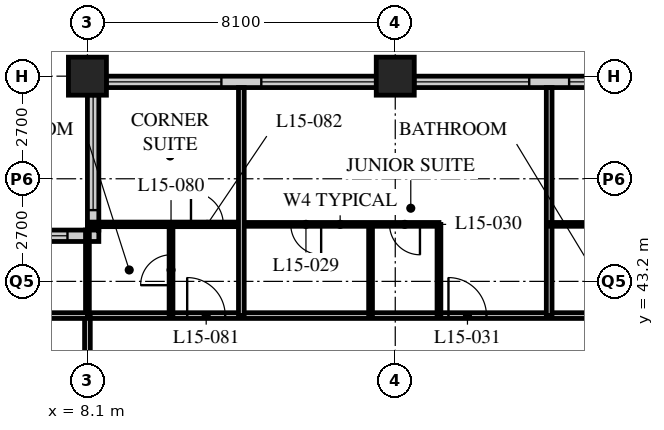
"""IFC4 building model, lengths in metres.
Left out: names, types, materials, properties, quantities, classifications, styles, units other than length and angle.
Written with IfcOpenShell. Run it as: python <this file> out.ifc"""

import sys

from ifc_helpers import new_model, si_unit, direction, frame, frame_2d, origin, origin_2d, place, context, subcontext, project, spatial, rectangle, hollow_rectangle, extrude, element, fill, save


model = new_model("IFC4")
c1 = context("Model", 3, precision=1e-05, world=origin(), true_north=direction((0.0, 1.0)))
c2 = subcontext(c1, "Body", "Model", "MODEL_VIEW")
j1 = project(units=[si_unit("LENGTHUNIT", "METRE"), si_unit("PLANEANGLEUNIT", "RADIAN")], contexts=[c1])
p1 = place(None, origin())
s1 = spatial("IfcSite", under=j1, at=p1, CompositionType="ELEMENT")
p2 = place(p1, origin())
s2 = spatial("IfcBuilding", under=s1, at=p2, CompositionType="ELEMENT")
p3 = place(p2, frame((0.0, 0.0, 63.6)))
s3 = spatial("IfcBuildingStorey", under=s2, at=p3, CompositionType="ELEMENT", Elevation=63.6)
for number, where, z_axis, x_axis in (
    (1, (8.1, 48.6, 0.0), (0.0, 0.0, 1.0), (1.0, 0.0, 0.0)),
    (2, (16.2, 48.6, 0.0), (0.0, 0.0, 1.0), (1.0, 0.0, 0.0)),
):
    element("IfcColumn", number, at=place(p3, frame(where, z_axis=z_axis, x_axis=x_axis)), inside=s3, PredefinedType="COLUMN", context=c2, shape_type="SweptSolid", body=[
        extrude(hollow_rectangle(XDim=1.0, YDim=1.0, WallThickness=0.1, at=origin_2d()), origin(), (0.0, 0.0, 1.0), 3.4),
    ])
p4 = place(p3, frame((48.3, 48.45, 0.0), z_axis=(0.0, 0.0, 1.0), x_axis=(-1.0, 0.0, 0.0)))
e3 = element("IfcWall", 3, at=p4, inside=s3, PredefinedType="SOLIDWALL", context=c2, shape_type="SweptSolid", body=[
    extrude(rectangle(XDim=40.2, YDim=0.3, at=frame_2d((20.1, 0.0))), origin(), (0.0, 0.0, 1.0), 3.19),
])
p5 = place(p4, frame((0.225, 0.0, 0.9)))
e4 = element("IfcOpeningElement", 4, at=p5, cuts=e3, PredefinedType="OPENING", context=c2, shape_type="SweptSolid", body=[
    extrude(rectangle(XDim=3.0, YDim=2.0, at=frame_2d((1.5, 1.0))), frame((0.0, 0.16, 0.0), z_axis=(0.0, -1.0, 0.0), x_axis=(1.0, 0.0, 0.0)), (0.0, 0.0, 1.0), 0.32),
])
p6 = place(p4, frame((4.275, 0.0, 0.9)))
e5 = element("IfcOpeningElement", 5, at=p6, cuts=e3, PredefinedType="OPENING", context=c2, shape_type="SweptSolid", body=[
    extrude(rectangle(XDim=3.0, YDim=2.0, at=frame_2d((1.5, 1.0))), frame((0.0, 0.16, 0.0), z_axis=(0.0, -1.0, 0.0), x_axis=(1.0, 0.0, 0.0)), (0.0, 0.0, 1.0), 0.32),
])
p7 = place(p4, frame((8.325, 0.0, 0.9)))
e6 = element("IfcOpeningElement", 6, at=p7, cuts=e3, PredefinedType="OPENING", context=c2, shape_type="SweptSolid", body=[
    extrude(rectangle(XDim=3.0, YDim=2.0, at=frame_2d((1.5, 1.0))), frame((0.0, 0.16, 0.0), z_axis=(0.0, -1.0, 0.0), x_axis=(1.0, 0.0, 0.0)), (0.0, 0.0, 1.0), 0.32),
])
p8 = place(p4, frame((12.375, 0.0, 0.9)))
e7 = element("IfcOpeningElement", 7, at=p8, cuts=e3, PredefinedType="OPENING", context=c2, shape_type="SweptSolid", body=[
    extrude(rectangle(XDim=3.0, YDim=2.0, at=frame_2d((1.5, 1.0))), frame((0.0, 0.16, 0.0), z_axis=(0.0, -1.0, 0.0), x_axis=(1.0, 0.0, 0.0)), (0.0, 0.0, 1.0), 0.32),
])
p9 = place(p4, frame((16.425, 0.0, 0.9)))
e8 = element("IfcOpeningElement", 8, at=p9, cuts=e3, PredefinedType="OPENING", context=c2, shape_type="SweptSolid", body=[
    extrude(rectangle(XDim=3.0, YDim=2.0, at=frame_2d((1.5, 1.0))), frame((0.0, 0.16, 0.0), z_axis=(0.0, -1.0, 0.0), x_axis=(1.0, 0.0, 0.0)), (0.0, 0.0, 1.0), 0.32),
])
p10 = place(p4, frame((20.475, 0.0, 0.9)))
e9 = element("IfcOpeningElement", 9, at=p10, cuts=e3, PredefinedType="OPENING", context=c2, shape_type="SweptSolid", body=[
    extrude(rectangle(XDim=3.0, YDim=2.0, at=frame_2d((1.5, 1.0))), frame((0.0, 0.16, 0.0), z_axis=(0.0, -1.0, 0.0), x_axis=(1.0, 0.0, 0.0)), (0.0, 0.0, 1.0), 0.32),
])
p11 = place(p4, frame((24.525, 0.0, 0.9)))
e10 = element("IfcOpeningElement", 10, at=p11, cuts=e3, PredefinedType="OPENING", context=c2, shape_type="SweptSolid", body=[
    extrude(rectangle(XDim=3.0, YDim=2.0, at=frame_2d((1.5, 1.0))), frame((0.0, 0.16, 0.0), z_axis=(0.0, -1.0, 0.0), x_axis=(1.0, 0.0, 0.0)), (0.0, 0.0, 1.0), 0.32),
])
p12 = place(p4, frame((28.575, 0.0, 0.9)))
e11 = element("IfcOpeningElement", 11, at=p12, cuts=e3, PredefinedType="OPENING", context=c2, shape_type="SweptSolid", body=[
    extrude(rectangle(XDim=3.0, YDim=2.0, at=frame_2d((1.5, 1.0))), frame((0.0, 0.16, 0.0), z_axis=(0.0, -1.0, 0.0), x_axis=(1.0, 0.0, 0.0)), (0.0, 0.0, 1.0), 0.32),
])
p13 = place(p4, frame((32.625, 0.0, 0.9)))
e12 = element("IfcOpeningElement", 12, at=p13, cuts=e3, PredefinedType="OPENING", context=c2, shape_type="SweptSolid", body=[
    extrude(rectangle(XDim=3.0, YDim=2.0, at=frame_2d((1.5, 1.0))), frame((0.0, 0.16, 0.0), z_axis=(0.0, -1.0, 0.0), x_axis=(1.0, 0.0, 0.0)), (0.0, 0.0, 1.0), 0.32),
])
p14 = place(p4, frame((36.675, 0.0, 0.9)))
e13 = element("IfcOpeningElement", 13, at=p14, cuts=e3, PredefinedType="OPENING", context=c2, shape_type="SweptSolid", body=[
    extrude(rectangle(XDim=3.0, YDim=2.0, at=frame_2d((1.5, 1.0))), frame((0.0, 0.16, 0.0), z_axis=(0.0, -1.0, 0.0), x_axis=(1.0, 0.0, 0.0)), (0.0, 0.0, 1.0), 0.32),
])
p15 = place(p3, frame((8.25, 48.3, 0.0), z_axis=(0.0, 0.0, 1.0), x_axis=(0.0, -1.0, 0.0)))
e14 = element("IfcWall", 14, at=p15, inside=s3, PredefinedType="SOLIDWALL", context=c2, shape_type="SweptSolid", body=[
    extrude(rectangle(XDim=3.75, YDim=0.3, at=frame_2d((1.875, 0.0))), origin(), (0.0, 0.0, 1.0), 3.19),
])
p16 = place(p15, frame((0.225, 0.0, 0.9)))
e15 = element("IfcOpeningElement", 15, at=p16, cuts=e14, PredefinedType="OPENING", context=c2, shape_type="SweptSolid", body=[
    extrude(rectangle(XDim=3.0, YDim=1.5, at=frame_2d((1.5, 0.75))), frame((0.0, 0.16, 0.0), z_axis=(0.0, -1.0, 0.0), x_axis=(1.0, 0.0, 0.0)), (0.0, 0.0, 1.0), 0.32),
])
p17 = place(p3, frame((8.4, 44.4, 0.0), z_axis=(0.0, 0.0, 1.0), x_axis=(-1.0, 0.0, 0.0)))
e16 = element("IfcWall", 16, at=p17, inside=s3, PredefinedType="SOLIDWALL", context=c2, shape_type="SweptSolid", body=[
    extrude(rectangle(XDim=4.35, YDim=0.3, at=frame_2d((2.175, 0.0))), origin(), (0.0, 0.0, 1.0), 3.19),
])
p18 = place(p17, frame((0.825, 0.0, 0.9)))
e17 = element("IfcOpeningElement", 17, at=p18, cuts=e16, PredefinedType="OPENING", context=c2, shape_type="SweptSolid", body=[
    extrude(rectangle(XDim=3.0, YDim=1.5, at=frame_2d((1.5, 0.75))), frame((0.0, 0.16, 0.0), z_axis=(0.0, -1.0, 0.0), x_axis=(1.0, 0.0, 0.0)), (0.0, 0.0, 1.0), 0.32),
])
p19 = place(p3, frame((8.1, 42.3, 0.0), z_axis=(0.0, 0.0, 1.0), x_axis=(1.0, 0.0, 0.0)))
e18 = element("IfcWall", 18, at=p19, inside=s3, PredefinedType="PARTITIONING", context=c2, shape_type="SweptSolid", body=[
    extrude(rectangle(XDim=36.45, YDim=0.15, at=frame_2d((18.225, 0.0))), origin(), (0.0, 0.0, 1.0), 3.19),
])
p20 = place(p19, frame((9.5, 0.0, 0.0)))
e19 = element("IfcOpeningElement", 19, at=p20, cuts=e18, PredefinedType="OPENING", context=c2, shape_type="SweptSolid", body=[
    extrude(rectangle(XDim=1.0, YDim=2.1, at=frame_2d((0.5, 1.05))), frame((0.0, 0.085, 0.0), z_axis=(0.0, -1.0, 0.0), x_axis=(1.0, 0.0, 0.0)), (0.0, 0.0, 1.0), 0.17),
])
p21 = place(p19, frame((14.6, 0.0, 0.0)))
e20 = element("IfcOpeningElement", 20, at=p21, cuts=e18, PredefinedType="OPENING", context=c2, shape_type="SweptSolid", body=[
    extrude(rectangle(XDim=1.0, YDim=2.1, at=frame_2d((0.5, 1.05))), frame((0.0, 0.085, 0.0), z_axis=(0.0, -1.0, 0.0), x_axis=(1.0, 0.0, 0.0)), (0.0, 0.0, 1.0), 0.17),
])
p22 = place(p19, frame((18.65, 0.0, 0.0)))
e21 = element("IfcOpeningElement", 21, at=p22, cuts=e18, PredefinedType="OPENING", context=c2, shape_type="SweptSolid", body=[
    extrude(rectangle(XDim=1.0, YDim=2.1, at=frame_2d((0.5, 1.05))), frame((0.0, 0.085, 0.0), z_axis=(0.0, -1.0, 0.0), x_axis=(1.0, 0.0, 0.0)), (0.0, 0.0, 1.0), 0.17),
])
p23 = place(p19, frame((25.7, 0.0, 0.0)))
e22 = element("IfcOpeningElement", 22, at=p23, cuts=e18, PredefinedType="OPENING", context=c2, shape_type="SweptSolid", body=[
    extrude(rectangle(XDim=1.0, YDim=2.1, at=frame_2d((0.5, 1.05))), frame((0.0, 0.085, 0.0), z_axis=(0.0, -1.0, 0.0), x_axis=(1.0, 0.0, 0.0)), (0.0, 0.0, 1.0), 0.17),
])
p24 = place(p19, frame((30.8, 0.0, 0.0)))
e23 = element("IfcOpeningElement", 23, at=p24, cuts=e18, PredefinedType="OPENING", context=c2, shape_type="SweptSolid", body=[
    extrude(rectangle(XDim=1.0, YDim=2.1, at=frame_2d((0.5, 1.05))), frame((0.0, 0.085, 0.0), z_axis=(0.0, -1.0, 0.0), x_axis=(1.0, 0.0, 0.0)), (0.0, 0.0, 1.0), 0.17),
])
p25 = place(p19, frame((32.825, 0.0, 0.0)))
e24 = element("IfcOpeningElement", 24, at=p25, cuts=e18, PredefinedType="OPENING", context=c2, shape_type="SweptSolid", body=[
    extrude(rectangle(XDim=1.0, YDim=2.1, at=frame_2d((0.5, 1.05))), frame((0.0, 0.085, 0.0), z_axis=(0.0, -1.0, 0.0), x_axis=(1.0, 0.0, 0.0)), (0.0, 0.0, 1.0), 0.17),
])
p26 = place(p19, frame((2.625, 0.0, 0.0)))
e25 = element("IfcOpeningElement", 25, at=p26, cuts=e18, PredefinedType="OPENING", context=c2, shape_type="SweptSolid", body=[
    extrude(rectangle(XDim=1.0, YDim=2.1, at=frame_2d((0.5, 1.05))), frame((0.0, 0.085, 0.0), z_axis=(0.0, -1.0, 0.0), x_axis=(1.0, 0.0, 0.0)), (0.0, 0.0, 1.0), 0.17),
])
p27 = place(p3, frame((8.1, 12.15, 0.0), z_axis=(0.0, 0.0, 1.0), x_axis=(0.0, 1.0, 0.0)))
e26 = element("IfcWall", 26, at=p27, inside=s3, PredefinedType="PARTITIONING", context=c2, shape_type="SweptSolid", body=[
    extrude(rectangle(XDim=30.15, YDim=0.15, at=frame_2d((15.075, 0.0))), origin(), (0.0, 0.0, 1.0), 2.578),
])
p28 = place(p27, frame((0.6, 0.0, 0.0)))
e27 = element("IfcOpeningElement", 27, at=p28, cuts=e26, PredefinedType="OPENING", context=c2, shape_type="SweptSolid", body=[
    extrude(rectangle(XDim=1.0, YDim=2.1, at=frame_2d((0.5, 1.05))), frame((0.0, 0.085, 0.0), z_axis=(0.0, -1.0, 0.0), x_axis=(1.0, 0.0, 0.0)), (0.0, 0.0, 1.0), 0.17),
])
p29 = place(p27, frame((6.8, 0.0, 0.0)))
e28 = element("IfcOpeningElement", 28, at=p29, cuts=e26, PredefinedType="OPENING", context=c2, shape_type="SweptSolid", body=[
    extrude(rectangle(XDim=1.0, YDim=2.1, at=frame_2d((0.5, 1.05))), frame((0.0, 0.085, 0.0), z_axis=(0.0, -1.0, 0.0), x_axis=(1.0, 0.0, 0.0)), (0.0, 0.0, 1.0), 0.17),
])
p30 = place(p27, frame((8.7, 0.0, 0.0)))
e29 = element("IfcOpeningElement", 29, at=p30, cuts=e26, PredefinedType="OPENING", context=c2, shape_type="SweptSolid", body=[
    extrude(rectangle(XDim=1.0, YDim=2.1, at=frame_2d((0.5, 1.05))), frame((0.0, 0.085, 0.0), z_axis=(0.0, -1.0, 0.0), x_axis=(1.0, 0.0, 0.0)), (0.0, 0.0, 1.0), 0.17),
])
p31 = place(p27, frame((14.6, 0.0, 0.0)))
e30 = element("IfcOpeningElement", 30, at=p31, cuts=e26, PredefinedType="OPENING", context=c2, shape_type="SweptSolid", body=[
    extrude(rectangle(XDim=1.0, YDim=2.1, at=frame_2d((0.5, 1.05))), frame((0.0, 0.085, 0.0), z_axis=(0.0, -1.0, 0.0), x_axis=(1.0, 0.0, 0.0)), (0.0, 0.0, 1.0), 0.17),
])
p32 = place(p27, frame((21.65, 0.0, 0.0)))
e31 = element("IfcOpeningElement", 31, at=p32, cuts=e26, PredefinedType="OPENING", context=c2, shape_type="SweptSolid", body=[
    extrude(rectangle(XDim=1.0, YDim=2.1, at=frame_2d((0.5, 1.05))), frame((0.0, 0.085, 0.0), z_axis=(0.0, -1.0, 0.0), x_axis=(1.0, 0.0, 0.0)), (0.0, 0.0, 1.0), 0.17),
])
p33 = place(p27, frame((26.75, 0.0, 0.0)))
e32 = element("IfcOpeningElement", 32, at=p33, cuts=e26, PredefinedType="OPENING", context=c2, shape_type="SweptSolid", body=[
    extrude(rectangle(XDim=1.0, YDim=2.1, at=frame_2d((0.5, 1.05))), frame((0.0, 0.085, 0.0), z_axis=(0.0, -1.0, 0.0), x_axis=(1.0, 0.0, 0.0)), (0.0, 0.0, 1.0), 0.17),
])
p34 = place(p3, frame((12.15, 44.7, 0.0), z_axis=(0.0, 0.0, 1.0), x_axis=(1.0, 0.0, 0.0)))
e33 = element("IfcWall", 33, at=p34, inside=s3, PredefinedType="PARTITIONING", context=c2, shape_type="SweptSolid", body=[
    extrude(rectangle(XDim=5.2, YDim=0.1, at=frame_2d((2.6, 0.0))), origin(), (0.0, 0.0, 1.0), 3.19),
])
p35 = place(p34, frame((1.3, 0.0, 0.0)))
e34 = element("IfcOpeningElement", 34, at=p35, cuts=e33, PredefinedType="OPENING", context=c2, shape_type="SweptSolid", body=[
    extrude(rectangle(XDim=0.8, YDim=2.1, at=frame_2d((0.4, 1.05))), frame((0.0, 0.06, 0.0), z_axis=(0.0, -1.0, 0.0), x_axis=(1.0, 0.0, 0.0)), (0.0, 0.0, 1.0), 0.12),
])
p36 = place(p34, frame((3.9, 0.0, 0.0)))
e35 = element("IfcOpeningElement", 35, at=p36, cuts=e33, PredefinedType="OPENING", context=c2, shape_type="SweptSolid", body=[
    extrude(rectangle(XDim=0.8, YDim=2.1, at=frame_2d((0.4, 1.05))), frame((0.0, 0.06, 0.0), z_axis=(0.0, -1.0, 0.0), x_axis=(1.0, 0.0, 0.0)), (0.0, 0.0, 1.0), 0.12),
])
for number, where, z_axis, x_axis in (
    (36, (15.55, 42.3, 0.0), (0.0, 0.0, 1.0), (0.0, 1.0, 0.0)),
    (37, (17.35, 42.3, 0.0), (0.0, 0.0, 1.0), (0.0, 1.0, 0.0)),
):
    element("IfcWall", number, at=place(p3, frame(where, z_axis=z_axis, x_axis=x_axis)), inside=s3, PredefinedType="PARTITIONING", context=c2, shape_type="SweptSolid", body=[
        extrude(rectangle(XDim=2.4, YDim=0.1, at=frame_2d((1.2, 0.0))), origin(), (0.0, 0.0, 1.0), 3.19),
    ])
p37 = place(p3, frame((20.25, 42.3, 0.0), z_axis=(0.0, 0.0, 1.0), x_axis=(0.0, 1.0, 0.0)))
e38 = element("IfcWall", 38, at=p37, inside=s3, PredefinedType="PARTITIONING", context=c2, shape_type="SweptSolid", body=[
    extrude(rectangle(XDim=6.0, YDim=0.15, at=frame_2d((3.0, 0.0))), origin(), (0.0, 0.0, 1.0), 3.19),
])
p38 = place(p3, frame((20.25, 44.7, 0.0), z_axis=(0.0, 0.0, 1.0), x_axis=(1.0, 0.0, 0.0)))
e39 = element("IfcWall", 39, at=p38, inside=s3, PredefinedType="PARTITIONING", context=c2, shape_type="SweptSolid", body=[
    extrude(rectangle(XDim=2.3, YDim=0.1, at=frame_2d((1.15, 0.0))), origin(), (0.0, 0.0, 1.0), 3.19),
])
p39 = place(p3, frame((8.1, 44.7, 0.0), z_axis=(0.0, 0.0, 1.0), x_axis=(1.0, 0.0, 0.0)))
e40 = element("IfcWall", 40, at=p39, inside=s3, PredefinedType="PARTITIONING", context=c2, shape_type="SweptSolid", body=[
    extrude(rectangle(XDim=4.05, YDim=0.12, at=frame_2d((2.025, 0.0))), origin(), (0.0, 0.0, 1.0), 3.19),
])
p40 = place(p39, frame((2.725, 0.0, 0.0)))
e41 = element("IfcOpeningElement", 41, at=p40, cuts=e40, PredefinedType="OPENING", context=c2, shape_type="SweptSolid", body=[
    extrude(rectangle(XDim=0.85, YDim=2.1, at=frame_2d((0.425, 1.05))), frame((0.0, 0.07, 0.0), z_axis=(0.0, -1.0, 0.0), x_axis=(1.0, 0.0, 0.0)), (0.0, 0.0, 1.0), 0.14),
])
p41 = place(p3, frame((10.3, 42.3, 0.0), z_axis=(0.0, 0.0, 1.0), x_axis=(0.0, 1.0, 0.0)))
e42 = element("IfcWall", 42, at=p41, inside=s3, PredefinedType="PARTITIONING", context=c2, shape_type="SweptSolid", body=[
    extrude(rectangle(XDim=2.4, YDim=0.1, at=frame_2d((1.2, 0.0))), origin(), (0.0, 0.0, 1.0), 3.19),
])
p42 = place(p41, frame((0.8, 0.0, 0.0)))
e43 = element("IfcOpeningElement", 43, at=p42, cuts=e42, PredefinedType="OPENING", context=c2, shape_type="SweptSolid", body=[
    extrude(rectangle(XDim=0.8, YDim=2.1, at=frame_2d((0.4, 1.05))), frame((0.0, 0.06, 0.0), z_axis=(0.0, -1.0, 0.0), x_axis=(1.0, 0.0, 0.0)), (0.0, 0.0, 1.0), 0.12),
])
p43 = place(p3, frame((8.1, 42.3, 0.0), z_axis=(0.0, 0.0, 1.0), x_axis=(0.0, 1.0, 0.0)))
e44 = element("IfcWall", 44, at=p43, inside=s3, PredefinedType="PARTITIONING", context=c2, shape_type="SweptSolid", body=[
    extrude(rectangle(XDim=2.25, YDim=0.1, at=frame_2d((1.125, 0.0))), origin(), (0.0, 0.0, 1.0), 2.578),
])
p44 = place(p3, frame((4.35, 42.3, 0.0), z_axis=(0.0, 0.0, 1.0), x_axis=(1.0, 0.0, 0.0)))
e45 = element("IfcWall", 45, at=p44, inside=s3, PredefinedType="PARTITIONING", context=c2, shape_type="SweptSolid", body=[
    extrude(rectangle(XDim=3.75, YDim=0.15, at=frame_2d((1.875, 0.0))), origin(), (0.0, 0.0, 1.0), 3.19),
])
p45 = place(p3, frame((12.15, 42.3, 0.0), z_axis=(0.0, 0.0, 1.0), x_axis=(0.0, 1.0, 0.0)))
e46 = element("IfcWall", 46, at=p45, inside=s3, PredefinedType="PARTITIONING", context=c2, shape_type="SweptSolid", body=[
    extrude(rectangle(XDim=6.0, YDim=0.15, at=frame_2d((3.0, 0.0))), origin(), (0.0, 0.0, 1.0), 3.19),
])
p46 = place(p11, origin())
e47 = element("IfcWindow", 47, at=p46, inside=s3, PartitioningType="SINGLE_PANEL", PredefinedType="WINDOW", context=c2, shape_type="SweptSolid", body=[
    extrude(rectangle(XDim=3.0, YDim=2.0, at=frame_2d((1.5, 1.0))), frame((0.0, 0.03, 0.0), z_axis=(0.0, -1.0, 0.0), x_axis=(1.0, 0.0, 0.0)), (0.0, 0.0, 1.0), 0.06),
])
fill(e10, e47)
p47 = place(p12, origin())
e48 = element("IfcWindow", 48, at=p47, inside=s3, PartitioningType="SINGLE_PANEL", PredefinedType="WINDOW", context=c2, shape_type="SweptSolid", body=[
    extrude(rectangle(XDim=3.0, YDim=2.0, at=frame_2d((1.5, 1.0))), frame((0.0, 0.03, 0.0), z_axis=(0.0, -1.0, 0.0), x_axis=(1.0, 0.0, 0.0)), (0.0, 0.0, 1.0), 0.06),
])
fill(e11, e48)
p48 = place(p13, origin())
e49 = element("IfcWindow", 49, at=p48, inside=s3, PartitioningType="SINGLE_PANEL", PredefinedType="WINDOW", context=c2, shape_type="SweptSolid", body=[
    extrude(rectangle(XDim=3.0, YDim=2.0, at=frame_2d((1.5, 1.0))), frame((0.0, 0.03, 0.0), z_axis=(0.0, -1.0, 0.0), x_axis=(1.0, 0.0, 0.0)), (0.0, 0.0, 1.0), 0.06),
])
fill(e12, e49)
p49 = place(p14, origin())
e50 = element("IfcWindow", 50, at=p49, inside=s3, PartitioningType="SINGLE_PANEL", PredefinedType="WINDOW", context=c2, shape_type="SweptSolid", body=[
    extrude(rectangle(XDim=3.0, YDim=2.0, at=frame_2d((1.5, 1.0))), frame((0.0, 0.03, 0.0), z_axis=(0.0, -1.0, 0.0), x_axis=(1.0, 0.0, 0.0)), (0.0, 0.0, 1.0), 0.06),
])
fill(e13, e50)
p50 = place(p16, origin())
e51 = element("IfcWindow", 51, at=p50, inside=s3, PartitioningType="SINGLE_PANEL", PredefinedType="WINDOW", context=c2, shape_type="SweptSolid", body=[
    extrude(rectangle(XDim=3.0, YDim=1.5, at=frame_2d((1.5, 0.75))), frame((0.0, 0.03, 0.0), z_axis=(0.0, -1.0, 0.0), x_axis=(1.0, 0.0, 0.0)), (0.0, 0.0, 1.0), 0.06),
])
fill(e15, e51)
p51 = place(p18, origin())
e52 = element("IfcWindow", 52, at=p51, inside=s3, PartitioningType="SINGLE_PANEL", PredefinedType="WINDOW", context=c2, shape_type="SweptSolid", body=[
    extrude(rectangle(XDim=3.0, YDim=1.5, at=frame_2d((1.5, 0.75))), frame((0.0, 0.03, 0.0), z_axis=(0.0, -1.0, 0.0), x_axis=(1.0, 0.0, 0.0)), (0.0, 0.0, 1.0), 0.06),
])
fill(e17, e52)
p52 = place(p35, origin())
e53 = element("IfcDoor", 53, at=p52, inside=s3, OperationType="SINGLE_SWING_LEFT", PredefinedType="DOOR", context=c2, shape_type="SweptSolid", body=[
    extrude(rectangle(XDim=0.8, YDim=2.1, at=frame_2d((0.4, 1.05))), frame((0.0, 0.025, 0.0), z_axis=(0.0, -1.0, 0.0), x_axis=(1.0, 0.0, 0.0)), (0.0, 0.0, 1.0), 0.05),
])
fill(e34, e53)
p53 = place(p36, origin())
e54 = element("IfcDoor", 54, at=p53, inside=s3, OperationType="SINGLE_SWING_LEFT", PredefinedType="DOOR", context=c2, shape_type="SweptSolid", body=[
    extrude(rectangle(XDim=0.8, YDim=2.1, at=frame_2d((0.4, 1.05))), frame((0.0, 0.025, 0.0), z_axis=(0.0, -1.0, 0.0), x_axis=(1.0, 0.0, 0.0)), (0.0, 0.0, 1.0), 0.05),
])
fill(e35, e54)
p54 = place(p20, origin())
e55 = element("IfcDoor", 55, at=p54, inside=s3, OperationType="SINGLE_SWING_LEFT", PredefinedType="DOOR", context=c2, shape_type="SweptSolid", body=[
    extrude(rectangle(XDim=1.0, YDim=2.1, at=frame_2d((0.5, 1.05))), frame((0.0, 0.025, 0.0), z_axis=(0.0, -1.0, 0.0), x_axis=(1.0, 0.0, 0.0)), (0.0, 0.0, 1.0), 0.05),
])
fill(e19, e55)
p55 = place(p42, origin())
e56 = element("IfcDoor", 56, at=p55, inside=s3, OperationType="SINGLE_SWING_LEFT", PredefinedType="DOOR", context=c2, shape_type="SweptSolid", body=[
    extrude(rectangle(XDim=0.8, YDim=2.1, at=frame_2d((0.4, 1.05))), frame((0.0, 0.025, 0.0), z_axis=(0.0, -1.0, 0.0), x_axis=(1.0, 0.0, 0.0)), (0.0, 0.0, 1.0), 0.05),
])
fill(e43, e56)
p56 = place(p26, origin())
e57 = element("IfcDoor", 57, at=p56, inside=s3, OperationType="SINGLE_SWING_LEFT", PredefinedType="DOOR", context=c2, shape_type="SweptSolid", body=[
    extrude(rectangle(XDim=1.0, YDim=2.1, at=frame_2d((0.5, 1.05))), frame((0.0, 0.025, 0.0), z_axis=(0.0, -1.0, 0.0), x_axis=(1.0, 0.0, 0.0)), (0.0, 0.0, 1.0), 0.05),
])
fill(e25, e57)
p57 = place(p40, origin())
e58 = element("IfcDoor", 58, at=p57, inside=s3, OperationType="SINGLE_SWING_LEFT", PredefinedType="DOOR", context=c2, shape_type="SweptSolid", body=[
    extrude(rectangle(XDim=0.85, YDim=2.1, at=frame_2d((0.425, 1.05))), frame((0.0, 0.025, 0.0), z_axis=(0.0, -1.0, 0.0), x_axis=(1.0, 0.0, 0.0)), (0.0, 0.0, 1.0), 0.05),
])
fill(e41, e58)
save(model, sys.argv[1])
